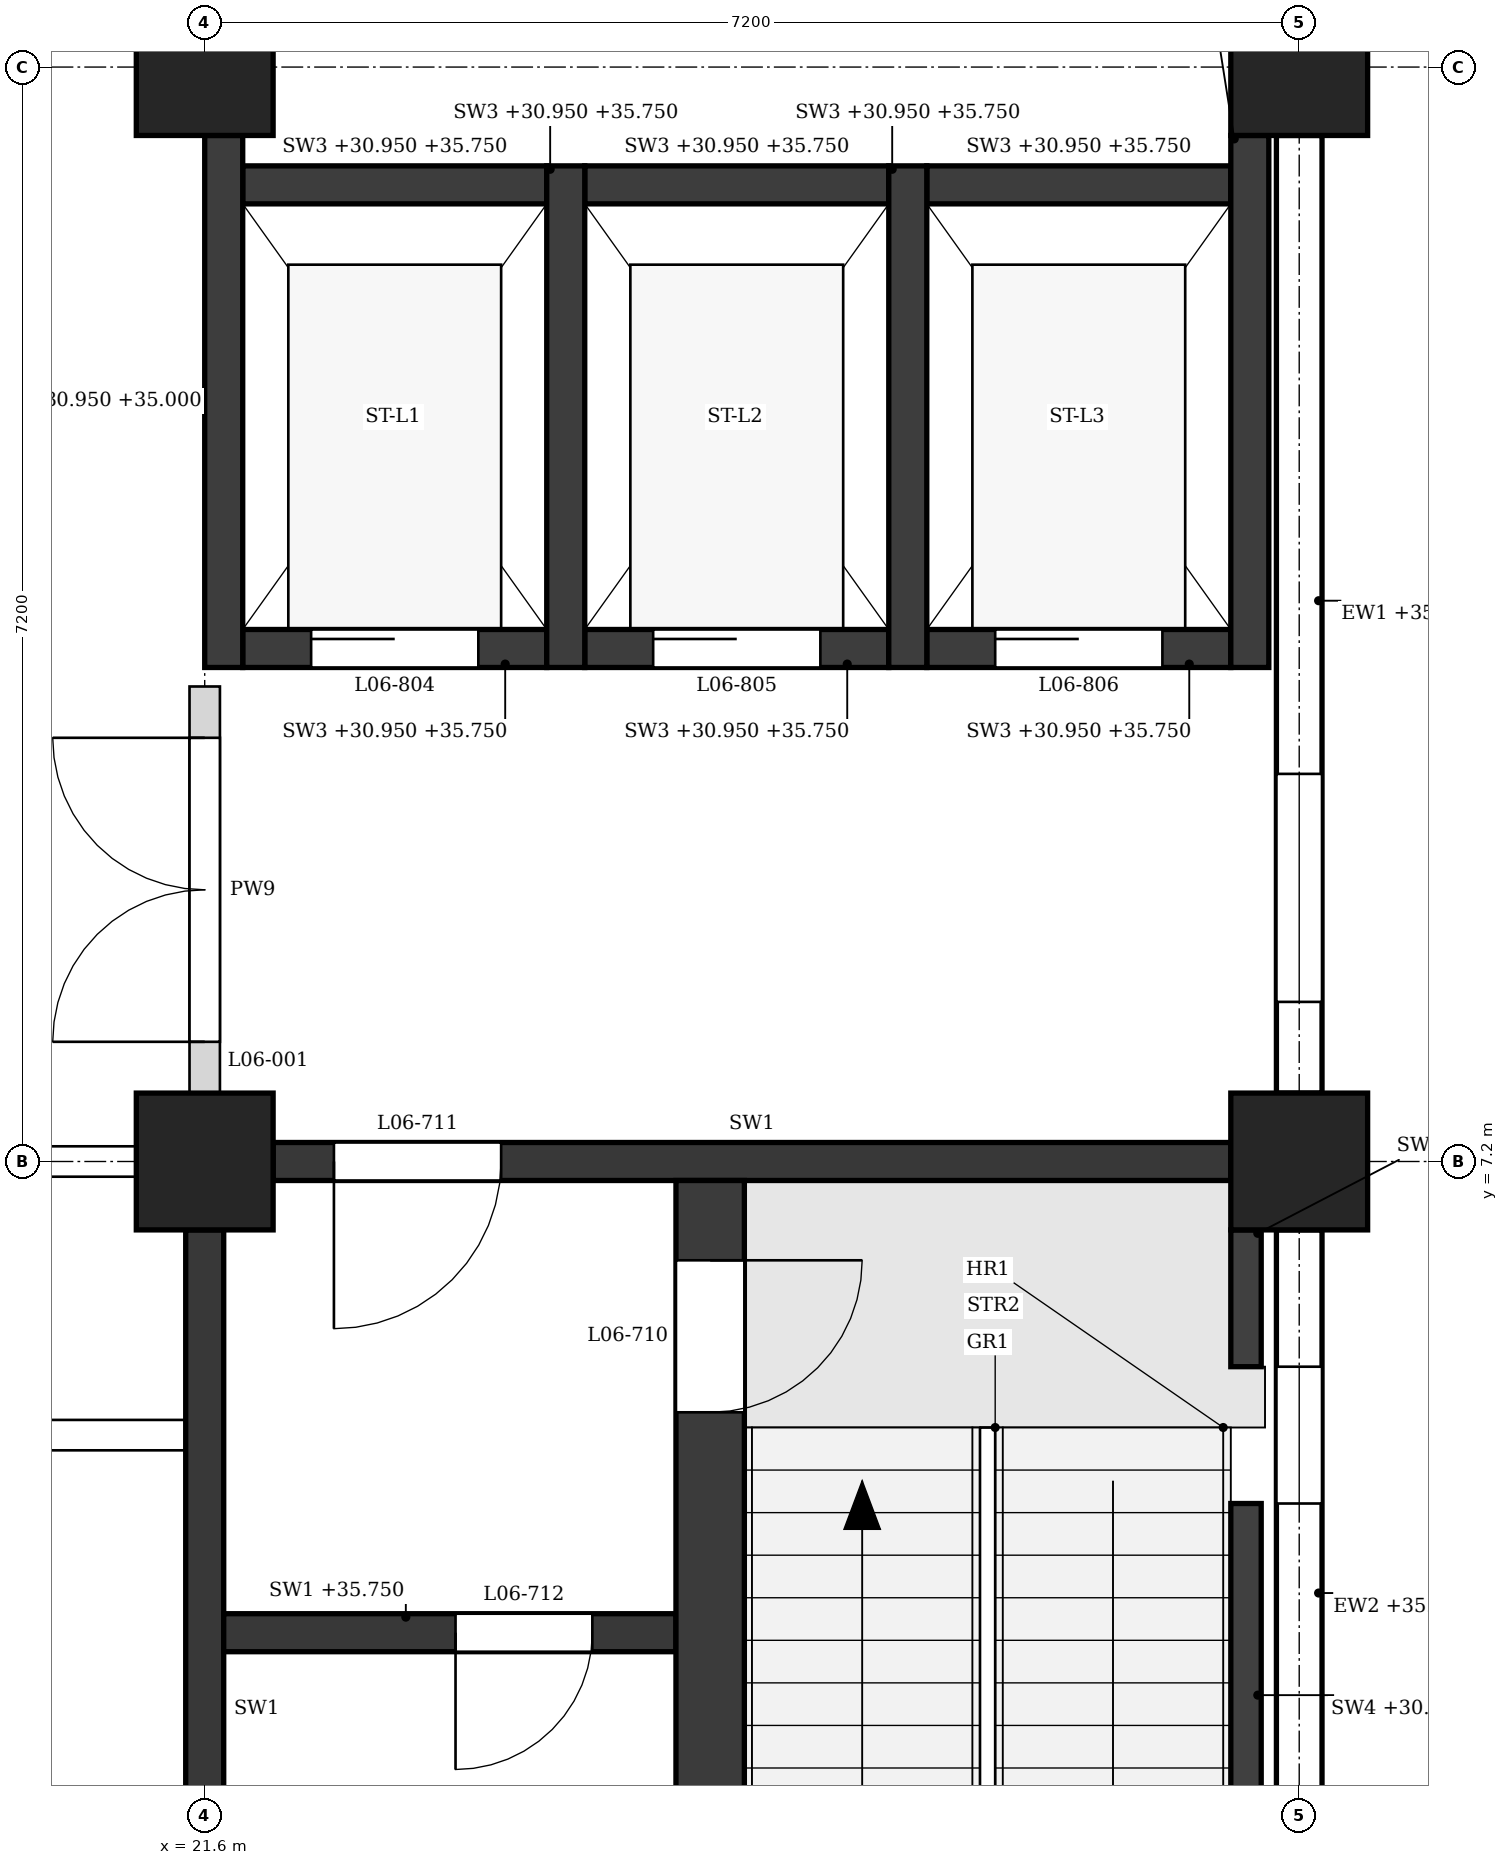
"""IFC4 building model, lengths in metres.
Left out: names, types, materials, properties, quantities, classifications, styles, units other than length and angle.
Written with IfcOpenShell. Run it as: python <this file> out.ifc"""

import sys

from ifc_helpers import new_model, si_unit, direction, frame, frame_2d, origin, origin_2d, place, context, subcontext, project, spatial, polyline, rectangle, outline, extrude, element, fill, save


model = new_model("IFC4")
c1 = context("Model", 3, precision=1e-05, world=origin(), true_north=direction((0.0, 1.0)))
c2 = subcontext(c1, "Body", "Model", "MODEL_VIEW")
j1 = project(units=[si_unit("LENGTHUNIT", "METRE"), si_unit("PLANEANGLEUNIT", "RADIAN")], contexts=[c1])
p1 = place(None, origin())
s1 = spatial("IfcSite", under=j1, at=p1, CompositionType="ELEMENT")
p2 = place(p1, origin())
s2 = spatial("IfcBuilding", under=s1, at=p2, CompositionType="ELEMENT")
p3 = place(p2, frame((0.0, 0.0, 31.2)))
s3 = spatial("IfcBuildingStorey", under=s2, at=p3, CompositionType="ELEMENT", Elevation=31.2)
for number, where, z_axis, x_axis in (
    (1, (21.6, 7.2, 0.0), (0.0, 0.0, 1.0), (1.0, 0.0, 0.0)),
    (2, (21.6, 14.4, 0.0), (0.0, 0.0, 1.0), (1.0, 0.0, 0.0)),
    (3, (28.8, 7.2, 0.0), (0.0, 0.0, 1.0), (1.0, 0.0, 0.0)),
    (4, (28.8, 14.4, 0.0), (0.0, 0.0, 1.0), (1.0, 0.0, 0.0)),
):
    element("IfcColumn", number, at=place(p3, frame(where, z_axis=z_axis, x_axis=x_axis)), inside=s3, PredefinedType="COLUMN", context=c2, shape_type="SweptSolid", body=[
        extrude(rectangle(XDim=0.9, YDim=0.9, at=origin_2d()), origin(), (0.0, 0.0, 1.0), 4.8),
    ])
p4 = place(p3, frame((28.8, 0.45, 0.0), z_axis=(0.0, 0.0, 1.0), x_axis=(0.0, 1.0, 0.0)))
e5 = element("IfcWall", 5, at=p4, inside=s3, PredefinedType="STANDARD", context=c2, shape_type="SweptSolid", body=[
    extrude(rectangle(XDim=6.3, YDim=0.3, at=frame_2d((3.15, 0.0))), origin(), (0.0, 0.0, 1.0), 3.95),
])
p5 = place(p4, frame((0.9, 0.0, 0.9)))
e6 = element("IfcOpeningElement", 6, at=p5, cuts=e5, PredefinedType="OPENING", context=c2, shape_type="SweptSolid", body=[
    extrude(outline(polyline([(0.0, 0.0), (0.9, 0.0), (0.9, 2.05), (0.45, 2.5), (0.0, 2.05), (0.0, 0.0)])), frame((0.0, 0.16, 0.0), z_axis=(0.0, -1.0, 0.0), x_axis=(1.0, 0.0, 0.0)), (0.0, 0.0, 1.0), 0.32),
])
p6 = place(p4, frame((4.5, 0.0, 0.9)))
e7 = element("IfcOpeningElement", 7, at=p6, cuts=e5, PredefinedType="OPENING", context=c2, shape_type="SweptSolid", body=[
    extrude(outline(polyline([(0.0, 0.0), (0.9, 0.0), (0.9, 2.05), (0.45, 2.5), (0.0, 2.05), (0.0, 0.0)])), frame((0.0, 0.16, 0.0), z_axis=(0.0, -1.0, 0.0), x_axis=(1.0, 0.0, 0.0)), (0.0, 0.0, 1.0), 0.32),
])
p7 = place(p3, frame((28.8, 7.65, 0.0), z_axis=(0.0, 0.0, 1.0), x_axis=(0.0, 1.0, 0.0)))
e8 = element("IfcWall", 8, at=p7, inside=s3, PredefinedType="STANDARD", context=c2, shape_type="SweptSolid", body=[
    extrude(rectangle(XDim=6.3, YDim=0.3, at=frame_2d((3.15, 0.0))), origin(), (0.0, 0.0, 1.0), 3.95),
])
p8 = place(p7, frame((0.6, 0.0, 0.9)))
e9 = element("IfcOpeningElement", 9, at=p8, cuts=e8, PredefinedType="OPENING", context=c2, shape_type="SweptSolid", body=[
    extrude(outline(polyline([(0.0, 0.0), (1.5, 0.0), (1.5, 1.75), (0.75, 2.5), (0.0, 1.75), (0.0, 0.0)])), frame((0.0, 0.16, 0.0), z_axis=(0.0, -1.0, 0.0), x_axis=(1.0, 0.0, 0.0)), (0.0, 0.0, 1.0), 0.32),
])
p9 = place(p3, frame((22.05, 7.2, 0.0), z_axis=(0.0, 0.0, 1.0), x_axis=(1.0, 0.0, 0.0)))
e10 = element("IfcWall", 10, at=p9, inside=s3, PredefinedType="SHEAR", context=c2, shape_type="SweptSolid", body=[
    extrude(rectangle(XDim=6.3, YDim=0.25, at=frame_2d((3.15, 0.0))), origin(), (0.0, 0.0, 1.0), 3.8),
])
p10 = place(p9, frame((0.4, 0.0, 0.0)))
e11 = element("IfcOpeningElement", 11, at=p10, cuts=e10, PredefinedType="OPENING", context=c2, shape_type="SweptSolid", body=[
    extrude(rectangle(XDim=1.1, YDim=2.1, at=frame_2d((0.55, 1.05))), frame((0.0, 0.135, 0.0), z_axis=(0.0, -1.0, 0.0), x_axis=(1.0, 0.0, 0.0)), (0.0, 0.0, 1.0), 0.27),
])
p11 = place(p3, frame((21.6, 0.45, 0.0), z_axis=(0.0, 0.0, 1.0), x_axis=(0.0, 1.0, 0.0)))
e12 = element("IfcWall", 12, at=p11, inside=s3, PredefinedType="SHEAR", context=c2, shape_type="SweptSolid", body=[
    extrude(rectangle(XDim=6.3, YDim=0.25, at=frame_2d((3.15, 0.0))), origin(), (0.0, 0.0, 1.0), 3.8),
])
p12 = place(p3, frame((28.45, 2.25, -0.25), z_axis=(0.0, 0.0, 1.0), x_axis=(0.0, 1.0, 0.0)))
e13 = element("IfcWall", 13, at=p12, inside=s3, PredefinedType="SHEAR", context=c2, shape_type="SweptSolid", body=[
    extrude(rectangle(XDim=2.7, YDim=0.2, at=frame_2d((1.35, 0.0))), origin(), (0.0, 0.0, 1.0), 4.8),
])
p13 = place(p3, frame((28.45, 5.85, -0.25), z_axis=(0.0, 0.0, 1.0), x_axis=(0.0, 1.0, 0.0)))
e14 = element("IfcWall", 14, at=p13, inside=s3, PredefinedType="SHEAR", context=c2, shape_type="SweptSolid", body=[
    extrude(rectangle(XDim=0.9, YDim=0.2, at=frame_2d((0.45, 0.0))), origin(), (0.0, 0.0, 1.0), 4.8),
])
p14 = place(p3, frame((24.925, 0.225, 0.0), z_axis=(0.0, 0.0, 1.0), x_axis=(0.0, 1.0, 0.0)))
e15 = element("IfcWall", 15, at=p14, inside=s3, PredefinedType="SHEAR", context=c2, shape_type="SweptSolid", body=[
    extrude(rectangle(XDim=6.85, YDim=0.45, at=frame_2d((3.425, 0.0))), origin(), (0.0, 0.0, 1.0), 4.55),
])
p15 = place(p14, frame((5.325, 0.0, 0.0)))
e16 = element("IfcOpeningElement", 16, at=p15, cuts=e15, PredefinedType="OPENING", context=c2, shape_type="SweptSolid", body=[
    extrude(rectangle(XDim=1.0, YDim=2.1, at=frame_2d((0.5, 1.05))), frame((0.0, 0.235, 0.0), z_axis=(0.0, -1.0, 0.0), x_axis=(1.0, 0.0, 0.0)), (0.0, 0.0, 1.0), 0.47),
])
p16 = place(p3, frame((21.725, 4.1, 0.0), z_axis=(0.0, 0.0, 1.0), x_axis=(1.0, 0.0, 0.0)))
e17 = element("IfcWall", 17, at=p16, inside=s3, PredefinedType="SHEAR", context=c2, shape_type="SweptSolid", body=[
    extrude(rectangle(XDim=2.975, YDim=0.25, at=frame_2d((1.487, 0.0))), origin(), (0.0, 0.0, 1.0), 4.55),
])
p17 = place(p16, frame((1.525, 0.0, 0.0)))
e18 = element("IfcOpeningElement", 18, at=p17, cuts=e17, PredefinedType="OPENING", context=c2, shape_type="SweptSolid", body=[
    extrude(rectangle(XDim=0.9, YDim=2.1, at=frame_2d((0.45, 1.05))), frame((0.0, 0.135, 0.0), z_axis=(0.0, -1.0, 0.0), x_axis=(1.0, 0.0, 0.0)), (0.0, 0.0, 1.0), 0.27),
])
p18 = place(p3, frame((21.725, 10.45, -0.25), z_axis=(0.0, 0.0, 1.0), x_axis=(0.0, 1.0, 0.0)))
e19 = element("IfcWall", 19, at=p18, inside=s3, PredefinedType="SHEAR", context=c2, shape_type="SweptSolid", body=[
    extrude(rectangle(XDim=3.5, YDim=0.25, at=frame_2d((1.75, 0.0))), origin(), (0.0, 0.0, 1.0), 4.05),
])
for number, where, z_axis, x_axis in (
    (20, (23.975, 10.45, -0.25), (0.0, 0.0, 1.0), (0.0, 1.0, 0.0)),
    (21, (26.225, 10.45, -0.25), (0.0, 0.0, 1.0), (0.0, 1.0, 0.0)),
):
    element("IfcWall", number, at=place(p3, frame(where, z_axis=z_axis, x_axis=x_axis)), inside=s3, PredefinedType="SHEAR", context=c2, shape_type="SweptSolid", body=[
        extrude(rectangle(XDim=3.3, YDim=0.25, at=frame_2d((1.65, 0.0))), origin(), (0.0, 0.0, 1.0), 4.8),
    ])
p19 = place(p3, frame((28.475, 10.45, -0.25), z_axis=(0.0, 0.0, 1.0), x_axis=(0.0, 1.0, 0.0)))
e22 = element("IfcWall", 22, at=p19, inside=s3, PredefinedType="SHEAR", context=c2, shape_type="SweptSolid", body=[
    extrude(rectangle(XDim=3.5, YDim=0.25, at=frame_2d((1.75, 0.0))), origin(), (0.0, 0.0, 1.0), 4.8),
])
p20 = place(p3, frame((21.85, 10.575, -0.25), z_axis=(0.0, 0.0, 1.0), x_axis=(1.0, 0.0, 0.0)))
e23 = element("IfcWall", 23, at=p20, inside=s3, PredefinedType="SHEAR", context=c2, shape_type="SweptSolid", body=[
    extrude(rectangle(XDim=2.0, YDim=0.25, at=frame_2d((1.0, 0.0))), origin(), (0.0, 0.0, 1.0), 4.8),
])
p21 = place(p20, frame((0.45, 0.0, 0.25)))
e24 = element("IfcOpeningElement", 24, at=p21, cuts=e23, PredefinedType="OPENING", context=c2, shape_type="SweptSolid", body=[
    extrude(rectangle(XDim=1.1, YDim=2.1, at=frame_2d((0.55, 1.05))), frame((0.0, 0.135, 0.0), z_axis=(0.0, -1.0, 0.0), x_axis=(1.0, 0.0, 0.0)), (0.0, 0.0, 1.0), 0.27),
])
p22 = place(p3, frame((21.85, 13.625, -0.25), z_axis=(0.0, 0.0, 1.0), x_axis=(1.0, 0.0, 0.0)))
e25 = element("IfcWall", 25, at=p22, inside=s3, PredefinedType="SHEAR", context=c2, shape_type="SweptSolid", body=[
    extrude(rectangle(XDim=2.0, YDim=0.25, at=frame_2d((1.0, 0.0))), origin(), (0.0, 0.0, 1.0), 4.8),
])
p23 = place(p3, frame((24.1, 10.575, -0.25), z_axis=(0.0, 0.0, 1.0), x_axis=(1.0, 0.0, 0.0)))
e26 = element("IfcWall", 26, at=p23, inside=s3, PredefinedType="SHEAR", context=c2, shape_type="SweptSolid", body=[
    extrude(rectangle(XDim=2.0, YDim=0.25, at=frame_2d((1.0, 0.0))), origin(), (0.0, 0.0, 1.0), 4.8),
])
p24 = place(p23, frame((0.45, 0.0, 0.25)))
e27 = element("IfcOpeningElement", 27, at=p24, cuts=e26, PredefinedType="OPENING", context=c2, shape_type="SweptSolid", body=[
    extrude(rectangle(XDim=1.1, YDim=2.1, at=frame_2d((0.55, 1.05))), frame((0.0, 0.135, 0.0), z_axis=(0.0, -1.0, 0.0), x_axis=(1.0, 0.0, 0.0)), (0.0, 0.0, 1.0), 0.27),
])
p25 = place(p3, frame((24.1, 13.625, -0.25), z_axis=(0.0, 0.0, 1.0), x_axis=(1.0, 0.0, 0.0)))
e28 = element("IfcWall", 28, at=p25, inside=s3, PredefinedType="SHEAR", context=c2, shape_type="SweptSolid", body=[
    extrude(rectangle(XDim=2.0, YDim=0.25, at=frame_2d((1.0, 0.0))), origin(), (0.0, 0.0, 1.0), 4.8),
])
p26 = place(p3, frame((26.35, 10.575, -0.25), z_axis=(0.0, 0.0, 1.0), x_axis=(1.0, 0.0, 0.0)))
e29 = element("IfcWall", 29, at=p26, inside=s3, PredefinedType="SHEAR", context=c2, shape_type="SweptSolid", body=[
    extrude(rectangle(XDim=2.0, YDim=0.25, at=frame_2d((1.0, 0.0))), origin(), (0.0, 0.0, 1.0), 4.8),
])
p27 = place(p26, frame((0.45, 0.0, 0.25)))
e30 = element("IfcOpeningElement", 30, at=p27, cuts=e29, PredefinedType="OPENING", context=c2, shape_type="SweptSolid", body=[
    extrude(rectangle(XDim=1.1, YDim=2.1, at=frame_2d((0.55, 1.05))), frame((0.0, 0.135, 0.0), z_axis=(0.0, -1.0, 0.0), x_axis=(1.0, 0.0, 0.0)), (0.0, 0.0, 1.0), 0.27),
])
p28 = place(p3, frame((26.35, 13.625, -0.25), z_axis=(0.0, 0.0, 1.0), x_axis=(1.0, 0.0, 0.0)))
e31 = element("IfcWall", 31, at=p28, inside=s3, PredefinedType="SHEAR", context=c2, shape_type="SweptSolid", body=[
    extrude(rectangle(XDim=2.0, YDim=0.25, at=frame_2d((1.0, 0.0))), origin(), (0.0, 0.0, 1.0), 4.8),
])
p29 = place(p3, frame((7.325, 5.4, 0.0), z_axis=(0.0, 0.0, 1.0), x_axis=(1.0, 0.0, 0.0)))
e32 = element("IfcWall", 32, at=p29, inside=s3, PredefinedType="PARTITIONING", context=c2, shape_type="SweptSolid", body=[
    extrude(outline(polyline([(0.0, 0.0), (14.15, 0.0), (14.15, 3.8), (14.025, 3.8), (14.025, 4.55), (7.325, 4.55), (7.325, 3.8), (6.825, 3.8), (6.825, 4.55), (0.125, 4.55), (0.125, 3.8), (0.0, 3.8), (0.0, 0.0)])), frame((0.0, 0.1, 0.0), z_axis=(0.0, -1.0, 0.0), x_axis=(1.0, 0.0, 0.0)), (0.0, 0.0, 1.0), 0.2),
])
p30 = place(p29, frame((1.238, 0.0, 0.0)))
e33 = element("IfcOpeningElement", 33, at=p30, cuts=e32, PredefinedType="OPENING", context=c2, shape_type="SweptSolid", body=[
    extrude(rectangle(XDim=1.0, YDim=2.1, at=frame_2d((0.5, 1.05))), frame((0.0, 0.11, 0.0), z_axis=(0.0, -1.0, 0.0), x_axis=(1.0, 0.0, 0.0)), (0.0, 0.0, 1.0), 0.22),
])
p31 = place(p29, frame((4.775, 0.0, 0.0)))
e34 = element("IfcOpeningElement", 34, at=p31, cuts=e32, PredefinedType="OPENING", context=c2, shape_type="SweptSolid", body=[
    extrude(rectangle(XDim=1.0, YDim=2.1, at=frame_2d((0.5, 1.05))), frame((0.0, 0.11, 0.0), z_axis=(0.0, -1.0, 0.0), x_axis=(1.0, 0.0, 0.0)), (0.0, 0.0, 1.0), 0.22),
])
p32 = place(p29, frame((8.375, 0.0, 0.0)))
e35 = element("IfcOpeningElement", 35, at=p32, cuts=e32, PredefinedType="OPENING", context=c2, shape_type="SweptSolid", body=[
    extrude(rectangle(XDim=1.0, YDim=2.1, at=frame_2d((0.5, 1.05))), frame((0.0, 0.11, 0.0), z_axis=(0.0, -1.0, 0.0), x_axis=(1.0, 0.0, 0.0)), (0.0, 0.0, 1.0), 0.22),
])
p33 = place(p29, frame((11.913, 0.0, 0.0)))
e36 = element("IfcOpeningElement", 36, at=p33, cuts=e32, PredefinedType="OPENING", context=c2, shape_type="SweptSolid", body=[
    extrude(rectangle(XDim=1.0, YDim=2.1, at=frame_2d((0.5, 1.05))), frame((0.0, 0.11, 0.0), z_axis=(0.0, -1.0, 0.0), x_axis=(1.0, 0.0, 0.0)), (0.0, 0.0, 1.0), 0.22),
])
p34 = place(p3, frame((14.85, 7.2, 0.0), z_axis=(0.0, 0.0, 1.0), x_axis=(1.0, 0.0, 0.0)))
e37 = element("IfcWall", 37, at=p34, inside=s3, PredefinedType="PARTITIONING", context=c2, shape_type="SweptSolid", body=[
    extrude(rectangle(XDim=6.3, YDim=0.2, at=frame_2d((3.15, 0.0))), origin(), (0.0, 0.0, 1.0), 3.8),
])
p35 = place(p34, frame((4.225, 0.0, 0.0)))
e38 = element("IfcOpeningElement", 38, at=p35, cuts=e37, PredefinedType="OPENING", context=c2, shape_type="SweptSolid", body=[
    extrude(rectangle(XDim=1.0, YDim=2.1, at=frame_2d((0.5, 1.05))), frame((0.0, 0.11, 0.0), z_axis=(0.0, -1.0, 0.0), x_axis=(1.0, 0.0, 0.0)), (0.0, 0.0, 1.0), 0.22),
])
p36 = place(p3, frame((21.6, 7.65, 0.0), z_axis=(0.0, 0.0, 1.0), x_axis=(0.0, 1.0, 0.0)))
e39 = element("IfcWall", 39, at=p36, inside=s3, PredefinedType="PARTITIONING", context=c2, shape_type="SweptSolid", body=[
    extrude(rectangle(XDim=2.675, YDim=0.2, at=frame_2d((1.337, 0.0))), origin(), (0.0, 0.0, 1.0), 3.8),
])
p37 = place(p36, frame((0.337, 0.0, 0.0)))
e40 = element("IfcOpeningElement", 40, at=p37, cuts=e39, PredefinedType="OPENING", context=c2, shape_type="SweptSolid", body=[
    extrude(rectangle(XDim=2.0, YDim=2.4, at=frame_2d((1.0, 1.2))), frame((0.0, 0.11, 0.0), z_axis=(0.0, -1.0, 0.0), x_axis=(1.0, 0.0, 0.0)), (0.0, 0.0, 1.0), 0.22),
])
p38 = place(p6, origin())
e41 = element("IfcWindow", 41, at=p38, inside=s3, PartitioningType="SINGLE_PANEL", PredefinedType="WINDOW", context=c2, shape_type="SweptSolid", body=[
    extrude(outline(polyline([(0.0, 0.0), (0.9, 0.0), (0.9, 2.05), (0.45, 2.5), (0.0, 2.05), (0.0, 0.0)])), frame((0.0, 0.03, 0.0), z_axis=(0.0, -1.0, 0.0), x_axis=(1.0, 0.0, 0.0)), (0.0, 0.0, 1.0), 0.06),
])
fill(e7, e41)
p39 = place(p8, origin())
e42 = element("IfcWindow", 42, at=p39, inside=s3, PartitioningType="SINGLE_PANEL", PredefinedType="WINDOW", context=c2, shape_type="SweptSolid", body=[
    extrude(outline(polyline([(0.0, 0.0), (1.5, 0.0), (1.5, 1.75), (0.75, 2.5), (0.0, 1.75), (0.0, 0.0)])), frame((0.0, 0.03, 0.0), z_axis=(0.0, -1.0, 0.0), x_axis=(1.0, 0.0, 0.0)), (0.0, 0.0, 1.0), 0.06),
])
fill(e9, e42)
p40 = place(p15, frame((1.0, 0.0, 0.0), z_axis=(0.0, 0.0, 1.0), x_axis=(-1.0, 0.0, 0.0)))
e43 = element("IfcDoor", 43, at=p40, inside=s3, OperationType="SINGLE_SWING_LEFT", PredefinedType="DOOR", context=c2, shape_type="SweptSolid", body=[
    extrude(rectangle(XDim=1.0, YDim=2.1, at=frame_2d((0.5, 1.05))), frame((0.0, 0.025, 0.0), z_axis=(0.0, -1.0, 0.0), x_axis=(1.0, 0.0, 0.0)), (0.0, 0.0, 1.0), 0.05),
])
fill(e16, e43)
p41 = place(p10, frame((1.1, 0.0, 0.0), z_axis=(0.0, 0.0, 1.0), x_axis=(-1.0, 0.0, 0.0)))
e44 = element("IfcDoor", 44, at=p41, inside=s3, OperationType="SINGLE_SWING_RIGHT", PredefinedType="DOOR", context=c2, shape_type="SweptSolid", body=[
    extrude(rectangle(XDim=1.1, YDim=2.1, at=frame_2d((0.55, 1.05))), frame((0.0, 0.025, 0.0), z_axis=(0.0, -1.0, 0.0), x_axis=(1.0, 0.0, 0.0)), (0.0, 0.0, 1.0), 0.05),
])
fill(e11, e44)
p42 = place(p17, frame((0.9, 0.0, 0.0), z_axis=(0.0, 0.0, 1.0), x_axis=(-1.0, 0.0, 0.0)))
e45 = element("IfcDoor", 45, at=p42, inside=s3, OperationType="SINGLE_SWING_RIGHT", PredefinedType="DOOR", context=c2, shape_type="SweptSolid", body=[
    extrude(rectangle(XDim=0.9, YDim=2.1, at=frame_2d((0.45, 1.05))), frame((0.0, 0.025, 0.0), z_axis=(0.0, -1.0, 0.0), x_axis=(1.0, 0.0, 0.0)), (0.0, 0.0, 1.0), 0.05),
])
fill(e18, e45)
p43 = place(p21, origin())
e46 = element("IfcDoor", 46, at=p43, inside=s3, OperationType="SLIDING_TO_LEFT", PredefinedType="DOOR", context=c2, shape_type="SweptSolid", body=[
    extrude(rectangle(XDim=1.1, YDim=2.1, at=frame_2d((0.55, 1.05))), frame((0.0, 0.025, 0.0), z_axis=(0.0, -1.0, 0.0), x_axis=(1.0, 0.0, 0.0)), (0.0, 0.0, 1.0), 0.05),
])
fill(e24, e46)
p44 = place(p24, origin())
e47 = element("IfcDoor", 47, at=p44, inside=s3, OperationType="SLIDING_TO_LEFT", PredefinedType="DOOR", context=c2, shape_type="SweptSolid", body=[
    extrude(rectangle(XDim=1.1, YDim=2.1, at=frame_2d((0.55, 1.05))), frame((0.0, 0.025, 0.0), z_axis=(0.0, -1.0, 0.0), x_axis=(1.0, 0.0, 0.0)), (0.0, 0.0, 1.0), 0.05),
])
fill(e27, e47)
p45 = place(p27, origin())
e48 = element("IfcDoor", 48, at=p45, inside=s3, OperationType="SLIDING_TO_LEFT", PredefinedType="DOOR", context=c2, shape_type="SweptSolid", body=[
    extrude(rectangle(XDim=1.1, YDim=2.1, at=frame_2d((0.55, 1.05))), frame((0.0, 0.025, 0.0), z_axis=(0.0, -1.0, 0.0), x_axis=(1.0, 0.0, 0.0)), (0.0, 0.0, 1.0), 0.05),
])
fill(e30, e48)
p46 = place(p37, origin())
e49 = element("IfcDoor", 49, at=p46, inside=s3, OperationType="DOUBLE_DOOR_SINGLE_SWING", PredefinedType="DOOR", context=c2, shape_type="SweptSolid", body=[
    extrude(rectangle(XDim=2.0, YDim=2.4, at=frame_2d((1.0, 1.2))), frame((0.0, 0.025, 0.0), z_axis=(0.0, -1.0, 0.0), x_axis=(1.0, 0.0, 0.0)), (0.0, 0.0, 1.0), 0.05),
])
fill(e40, e49)
save(model, sys.argv[1])
